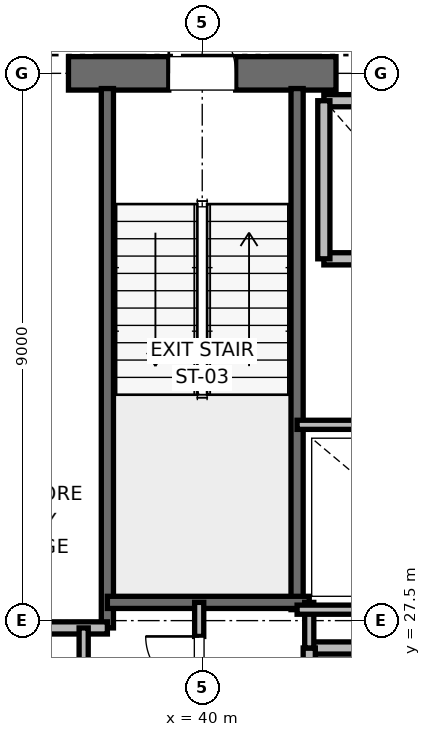
"""IFC4 building model, lengths in metres.
Left out: names, types, materials, properties, quantities, classifications, styles, units other than length and angle.
Written with IfcOpenShell. Run it as: python <this file> out.ifc"""

import sys

from ifc_helpers import new_model, si_unit, direction, frame, frame_2d, origin, place, context, subcontext, project, spatial, rectangle, extrude, element, fill, save


model = new_model("IFC4")
c1 = context("Model", 3, precision=1e-05, world=origin(), true_north=direction((0.0, 1.0)))
c2 = subcontext(c1, "Body", "Model", "MODEL_VIEW")
j1 = project(units=[si_unit("LENGTHUNIT", "METRE"), si_unit("PLANEANGLEUNIT", "RADIAN")], contexts=[c1])
p1 = place(None, origin())
s1 = spatial("IfcSite", under=j1, at=p1, CompositionType="ELEMENT")
p2 = place(p1, origin())
s2 = spatial("IfcBuilding", under=s1, at=p2, CompositionType="ELEMENT")
p3 = place(p2, frame((0.0, 0.0, 213.2)))
s3 = spatial("IfcBuildingStorey", under=s2, at=p3, CompositionType="ELEMENT", Elevation=213.2)
p4 = place(p3, frame((37.8, 36.5, 0.0), z_axis=(0.0, 0.0, 1.0), x_axis=(1.0, 0.0, 0.0)))
e1 = element("IfcWall", 1, at=p4, inside=s3, PredefinedType="SHEAR", context=c2, shape_type="SweptSolid", body=[
    extrude(rectangle(XDim=4.4, YDim=0.55, at=frame_2d((2.2, 0.0))), origin(), (0.0, 0.0, 1.0), 3.775),
])
p5 = place(p4, frame((1.65, 0.0, 0.0)))
e2 = element("IfcOpeningElement", 2, at=p5, cuts=e1, PredefinedType="OPENING", context=c2, shape_type="SweptSolid", body=[
    extrude(rectangle(XDim=1.1, YDim=2.15, at=frame_2d((0.55, 1.075))), frame((0.0, 0.275, 0.0), z_axis=(0.0, -1.0, 0.0), x_axis=(1.0, 0.0, 0.0)), (0.0, 0.0, 1.0), 0.55),
])
p6 = place(p3, frame((38.44, 27.38, 0.0), z_axis=(0.0, 0.0, 1.0), x_axis=(0.0, 1.0, 0.0)))
e3 = element("IfcWall", 3, at=p6, inside=s3, PredefinedType="SOLIDWALL", context=c2, shape_type="SweptSolid", body=[
    extrude(rectangle(XDim=8.87, YDim=0.2, at=frame_2d((4.435, 0.0))), origin(), (0.0, 0.0, 1.0), 3.775),
])
p7 = place(p3, frame((41.56, 27.68, 0.0), z_axis=(0.0, 0.0, 1.0), x_axis=(0.0, 1.0, 0.0)))
e4 = element("IfcWall", 4, at=p7, inside=s3, PredefinedType="SOLIDWALL", context=c2, shape_type="SweptSolid", body=[
    extrude(rectangle(XDim=8.57, YDim=0.2, at=frame_2d((4.285, 0.0))), origin(), (0.0, 0.0, 1.0), 3.775),
])
p8 = place(p3, frame((38.44, 27.8, 0.0), z_axis=(0.0, 0.0, 1.0), x_axis=(1.0, 0.0, 0.0)))
e5 = element("IfcWall", 5, at=p8, inside=s3, PredefinedType="SOLIDWALL", context=c2, shape_type="SweptSolid", body=[
    extrude(rectangle(XDim=3.32, YDim=0.2, at=frame_2d((1.66, 0.0))), origin(), (0.0, 0.0, 1.0), 3.775),
])
p9 = place(p3, frame((32.82, 27.38, 0.0), z_axis=(0.0, 0.0, 1.0), x_axis=(1.0, 0.0, 0.0)))
e6 = element("IfcWall", 6, at=p9, inside=s3, PredefinedType="PARTITIONING", context=c2, shape_type="SweptSolid", body=[
    extrude(rectangle(XDim=5.62, YDim=0.2, at=frame_2d((2.81, 0.0))), origin(), (0.0, 0.0, 1.0), 3.775),
])
p10 = place(p3, frame((43.44, 27.05, 0.0), z_axis=(0.0, 0.0, 1.0), x_axis=(-1.0, 0.0, 0.0)))
e7 = element("IfcWall", 7, at=p10, inside=s3, PredefinedType="SOLIDWALL", context=c2, shape_type="SweptSolid", body=[
    extrude(rectangle(XDim=1.68, YDim=0.2, at=frame_2d((0.84, 0.0))), origin(), (0.0, 0.0, 1.0), 3.775),
])
p11 = place(p3, frame((41.76, 27.05, 0.0), z_axis=(0.0, 0.0, 1.0), x_axis=(0.0, -1.0, 0.0)))
e8 = element("IfcWall", 8, at=p11, inside=s3, PredefinedType="SOLIDWALL", context=c2, shape_type="SweptSolid", body=[
    extrude(rectangle(XDim=2.6, YDim=0.2, at=frame_2d((1.3, 0.0))), origin(), (0.0, 0.0, 1.0), 3.775),
])
p12 = place(p3, frame((42.0, 33.45, 0.0), z_axis=(0.0, 0.0, 1.0), x_axis=(1.0, 0.0, 0.0)))
e9 = element("IfcWall", 9, at=p12, inside=s3, PredefinedType="SOLIDWALL", context=c2, shape_type="SweptSolid", body=[
    extrude(rectangle(XDim=2.3, YDim=0.2, at=frame_2d((1.15, 0.0))), origin(), (0.0, 0.0, 1.0), 3.775),
])
p13 = place(p3, frame((44.3, 36.05, 0.0), z_axis=(0.0, 0.0, 1.0), x_axis=(-1.0, 0.0, 0.0)))
e10 = element("IfcWall", 10, at=p13, inside=s3, PredefinedType="SOLIDWALL", context=c2, shape_type="SweptSolid", body=[
    extrude(rectangle(XDim=2.3, YDim=0.2, at=frame_2d((1.15, 0.0))), origin(), (0.0, 0.0, 1.0), 2.755),
])
p14 = place(p3, frame((42.0, 36.05, 0.0), z_axis=(0.0, 0.0, 1.0), x_axis=(0.0, -1.0, 0.0)))
e11 = element("IfcWall", 11, at=p14, inside=s3, PredefinedType="SOLIDWALL", context=c2, shape_type="SweptSolid", body=[
    extrude(rectangle(XDim=2.6, YDim=0.2, at=frame_2d((1.3, 0.0))), origin(), (0.0, 0.0, 1.0), 2.755),
])
p15 = place(p3, frame((41.76, 27.05, 0.0), z_axis=(0.0, 0.0, 1.0), x_axis=(0.0, 1.0, 0.0)))
e12 = element("IfcWall", 12, at=p15, inside=s3, PredefinedType="PARTITIONING", context=c2, shape_type="SweptSolid", body=[
    extrude(rectangle(XDim=0.75, YDim=0.15, at=frame_2d((0.375, 0.0))), origin(), (0.0, 0.0, 1.0), 2.85),
])
p16 = place(p3, frame((39.95, 25.8, 0.0), z_axis=(0.0, 0.0, 1.0), x_axis=(0.0, 1.0, 0.0)))
e13 = element("IfcWall", 13, at=p16, inside=s3, PredefinedType="PARTITIONING", context=c2, shape_type="SweptSolid", body=[
    extrude(rectangle(XDim=2.0, YDim=0.15, at=frame_2d((1.0, 0.0))), origin(), (0.0, 0.0, 1.0), 2.85),
])
p17 = place(p16, frame((0.56, 0.0, 0.0)))
e14 = element("IfcOpeningElement", 14, at=p17, cuts=e13, PredefinedType="OPENING", context=c2, shape_type="SweptSolid", body=[
    extrude(rectangle(XDim=0.88, YDim=2.1, at=frame_2d((0.44, 1.05))), frame((0.0, 0.075, 0.0), z_axis=(0.0, -1.0, 0.0), x_axis=(1.0, 0.0, 0.0)), (0.0, 0.0, 1.0), 0.15),
])
p18 = place(p3, frame((38.05, 18.6, 0.0), z_axis=(0.0, 0.0, 1.0), x_axis=(0.0, 1.0, 0.0)))
e15 = element("IfcWall", 15, at=p18, inside=s3, PredefinedType="PARTITIONING", context=c2, shape_type="SweptSolid", body=[
    extrude(rectangle(XDim=8.78, YDim=0.15, at=frame_2d((4.39, 0.0))), origin(), (0.0, 0.0, 1.0), 2.755),
])
p19 = place(p18, frame((3.89, 0.0, 0.0)))
e16 = element("IfcOpeningElement", 16, at=p19, cuts=e15, PredefinedType="OPENING", context=c2, shape_type="SweptSolid", body=[
    extrude(rectangle(XDim=1.0, YDim=2.15, at=frame_2d((0.5, 1.075))), frame((0.0, 0.075, 0.0), z_axis=(0.0, -1.0, 0.0), x_axis=(1.0, 0.0, 0.0)), (0.0, 0.0, 1.0), 0.15),
])
p20 = place(p3, frame((41.56, 27.68, 0.0), z_axis=(0.0, 0.0, 1.0), x_axis=(1.0, 0.0, 0.0)))
e17 = element("IfcWall", 17, at=p20, inside=s3, PredefinedType="PARTITIONING", context=c2, shape_type="SweptSolid", body=[
    extrude(rectangle(XDim=3.59, YDim=0.15, at=frame_2d((1.795, 0.0))), origin(), (0.0, 0.0, 1.0), 2.85),
])
p21 = place(p3, frame((41.56, 30.72, 0.0), z_axis=(0.0, 0.0, 1.0), x_axis=(1.0, 0.0, 0.0)))
e18 = element("IfcWall", 18, at=p21, inside=s3, PredefinedType="PARTITIONING", context=c2, shape_type="SweptSolid", body=[
    extrude(rectangle(XDim=3.59, YDim=0.15, at=frame_2d((1.795, 0.0))), origin(), (0.0, 0.0, 1.0), 2.85),
])
p22 = place(p21, frame((1.355, 0.0, 0.0)))
e19 = element("IfcOpeningElement", 19, at=p22, cuts=e18, PredefinedType="OPENING", context=c2, shape_type="SweptSolid", body=[
    extrude(rectangle(XDim=0.88, YDim=2.1, at=frame_2d((0.44, 1.05))), frame((0.0, 0.075, 0.0), z_axis=(0.0, -1.0, 0.0), x_axis=(1.0, 0.0, 0.0)), (0.0, 0.0, 1.0), 0.15),
])
p23 = place(p5, origin())
e20 = element("IfcDoor", 20, at=p23, inside=s3, OperationType="SINGLE_SWING_LEFT", PredefinedType="DOOR", context=c2, shape_type="SweptSolid", body=[
    extrude(rectangle(XDim=1.1, YDim=2.15, at=frame_2d((0.55, 1.075))), frame((0.0, 0.025, 0.0), z_axis=(0.0, -1.0, 0.0), x_axis=(1.0, 0.0, 0.0)), (0.0, 0.0, 1.0), 0.05),
])
fill(e2, e20)
p24 = place(p17, origin())
e21 = element("IfcDoor", 21, at=p24, inside=s3, OperationType="SINGLE_SWING_RIGHT", PredefinedType="DOOR", context=c2, shape_type="SweptSolid", body=[
    extrude(rectangle(XDim=0.88, YDim=2.1, at=frame_2d((0.44, 1.05))), frame((0.0, 0.025, 0.0), z_axis=(0.0, -1.0, 0.0), x_axis=(1.0, 0.0, 0.0)), (0.0, 0.0, 1.0), 0.05),
])
fill(e14, e21)
save(model, sys.argv[1])
